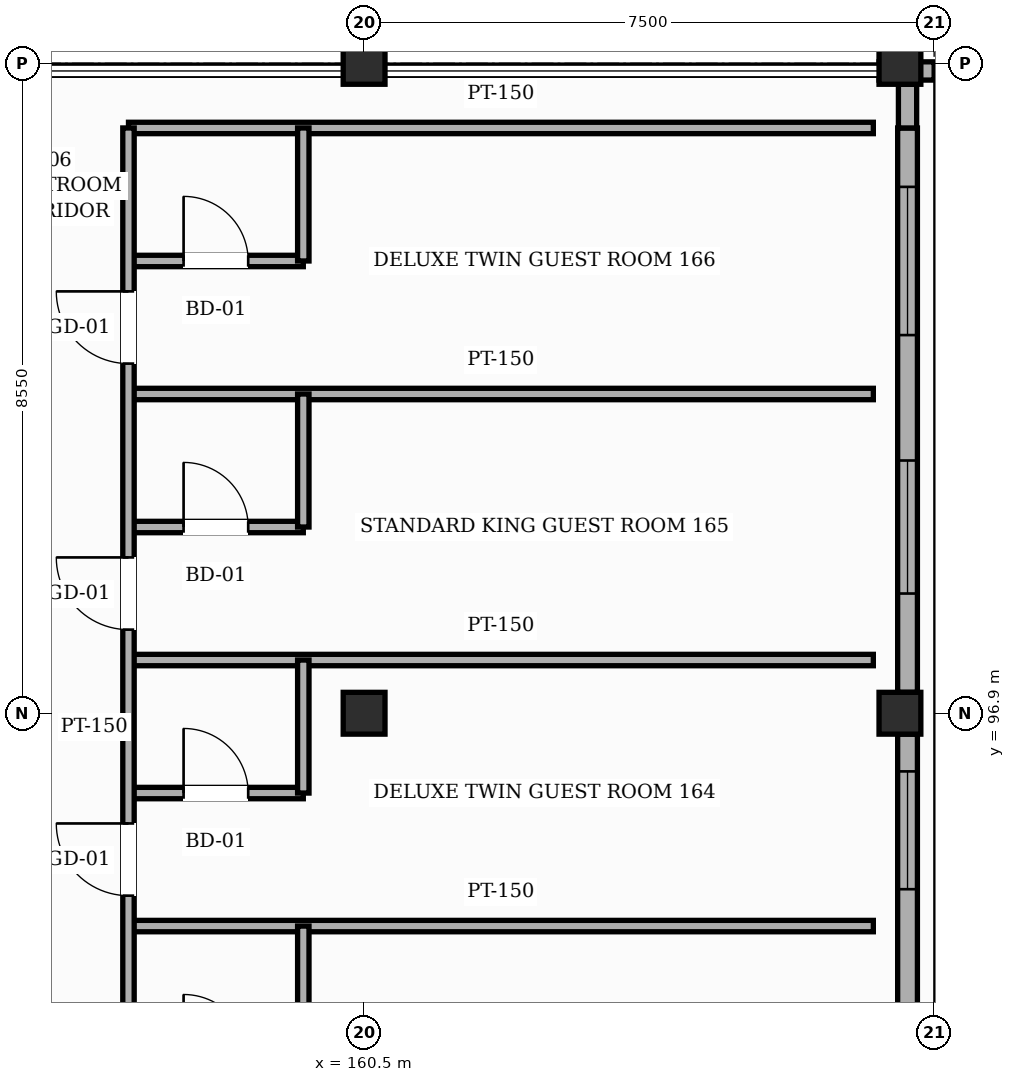
"""IFC4 building model, lengths in metres.
Left out: names, types, materials, properties, quantities, classifications, styles, units other than length and angle.
Written with IfcOpenShell. Run it as: python <this file> out.ifc"""

import sys

from ifc_helpers import new_model, si_unit, direction, frame, frame_2d, origin, origin_2d, place, context, subcontext, project, spatial, rectangle, hollow_rectangle, extrude, element, fill, save


model = new_model("IFC4")
c1 = context("Model", 3, precision=1e-05, world=origin(), true_north=direction((0.0, 1.0)))
c2 = subcontext(c1, "Body", "Model", "MODEL_VIEW")
j1 = project(units=[si_unit("LENGTHUNIT", "METRE"), si_unit("PLANEANGLEUNIT", "RADIAN")], contexts=[c1])
p1 = place(None, origin())
s1 = spatial("IfcSite", under=j1, at=p1, CompositionType="ELEMENT")
p2 = place(p1, origin())
s2 = spatial("IfcBuilding", under=s1, at=p2, CompositionType="ELEMENT")
p3 = place(p2, frame((0.0, 0.0, 28.2)))
s3 = spatial("IfcBuildingStorey", under=s2, at=p3, CompositionType="ELEMENT", Elevation=28.2)
p4 = place(p3, frame((160.5, 96.9, 0.0), z_axis=(0.0, 0.0, 1.0), x_axis=(1.0, 0.0, 0.0)))
e1 = element("IfcColumn", 1, at=p4, inside=s3, PredefinedType="COLUMN", context=c2, shape_type="SweptSolid", body=[
    extrude(hollow_rectangle(XDim=0.55, YDim=0.55, WallThickness=0.022, InnerFilletRadius=0.022, OuterFilletRadius=0.044, at=origin_2d()), origin(), (0.0, 0.0, 1.0), 3.6),
])
p5 = place(p3, frame((160.5, 105.45, 0.0), z_axis=(0.0, 0.0, 1.0), x_axis=(1.0, 0.0, 0.0)))
e2 = element("IfcColumn", 2, at=p5, inside=s3, PredefinedType="COLUMN", context=c2, shape_type="SweptSolid", body=[
    extrude(hollow_rectangle(XDim=0.55, YDim=0.55, WallThickness=0.022, InnerFilletRadius=0.022, OuterFilletRadius=0.044, at=origin_2d()), origin(), (0.0, 0.0, 1.0), 3.38),
])
p6 = place(p3, frame((167.55, 96.9, 0.0), z_axis=(0.0, 0.0, 1.0), x_axis=(1.0, 0.0, 0.0)))
e3 = element("IfcColumn", 3, at=p6, inside=s3, PredefinedType="COLUMN", context=c2, shape_type="SweptSolid", body=[
    extrude(hollow_rectangle(XDim=0.55, YDim=0.55, WallThickness=0.022, InnerFilletRadius=0.022, OuterFilletRadius=0.044, at=origin_2d()), origin(), (0.0, 0.0, 1.0), 3.6),
])
p7 = place(p3, frame((167.55, 105.45, 0.0), z_axis=(0.0, 0.0, 1.0), x_axis=(1.0, 0.0, 0.0)))
e4 = element("IfcColumn", 4, at=p7, inside=s3, PredefinedType="COLUMN", context=c2, shape_type="SweptSolid", body=[
    extrude(hollow_rectangle(XDim=0.55, YDim=0.55, WallThickness=0.022, InnerFilletRadius=0.022, OuterFilletRadius=0.044, at=origin_2d()), origin(), (0.0, 0.0, 1.0), 3.38),
])
p8 = place(p3, frame((167.65, 96.625, 0.0), z_axis=(0.0, 0.0, 1.0), x_axis=(0.0, -1.0, 0.0)))
e5 = element("IfcWall", 5, at=p8, inside=s3, PredefinedType="SOLIDWALL", context=c2, shape_type="SweptSolid", body=[
    extrude(rectangle(XDim=7.45, YDim=0.26, at=frame_2d((3.725, 0.0))), origin(), (0.0, 0.0, 1.0), 2.755),
])
p9 = place(p8, frame((3.6, 0.0, 0.85)))
e6 = element("IfcOpeningElement", 6, at=p9, cuts=e5, PredefinedType="OPENING", context=c2, shape_type="SweptSolid", body=[
    extrude(rectangle(XDim=1.35, YDim=1.35, at=frame_2d((0.675, 0.675))), frame((0.0, 0.14, 0.0), z_axis=(0.0, -1.0, 0.0), x_axis=(1.0, 0.0, 0.0)), (0.0, 0.0, 1.0), 0.28),
])
p10 = place(p8, frame((0.49, 0.0, 0.85)))
e7 = element("IfcOpeningElement", 7, at=p10, cuts=e5, PredefinedType="OPENING", context=c2, shape_type="SweptSolid", body=[
    extrude(rectangle(XDim=1.55, YDim=1.35, at=frame_2d((0.775, 0.675))), frame((0.0, 0.14, 0.0), z_axis=(0.0, -1.0, 0.0), x_axis=(1.0, 0.0, 0.0)), (0.0, 0.0, 1.0), 0.28),
])
p11 = place(p3, frame((167.65, 104.6, 0.0), z_axis=(0.0, 0.0, 1.0), x_axis=(0.0, -1.0, 0.0)))
e8 = element("IfcWall", 8, at=p11, inside=s3, PredefinedType="SOLIDWALL", context=c2, shape_type="SweptSolid", body=[
    extrude(rectangle(XDim=7.425, YDim=0.26, at=frame_2d((3.712, 0.0))), origin(), (0.0, 0.0, 1.0), 2.755),
])
p12 = place(p11, frame((4.375, 0.0, 0.85)))
e9 = element("IfcOpeningElement", 9, at=p12, cuts=e8, PredefinedType="OPENING", context=c2, shape_type="SweptSolid", body=[
    extrude(rectangle(XDim=1.75, YDim=1.35, at=frame_2d((0.875, 0.675))), frame((0.0, 0.14, 0.0), z_axis=(0.0, -1.0, 0.0), x_axis=(1.0, 0.0, 0.0)), (0.0, 0.0, 1.0), 0.28),
])
p13 = place(p11, frame((0.775, 0.0, 0.85)))
e10 = element("IfcOpeningElement", 10, at=p13, cuts=e8, PredefinedType="OPENING", context=c2, shape_type="SweptSolid", body=[
    extrude(rectangle(XDim=1.95, YDim=1.35, at=frame_2d((0.975, 0.675))), frame((0.0, 0.14, 0.0), z_axis=(0.0, -1.0, 0.0), x_axis=(1.0, 0.0, 0.0)), (0.0, 0.0, 1.0), 0.28),
])
p14 = place(p3, frame((167.65, 105.175, 0.0), z_axis=(0.0, 0.0, 1.0), x_axis=(0.0, -1.0, 0.0)))
e11 = element("IfcWall", 11, at=p14, inside=s3, PredefinedType="SOLIDWALL", context=c2, shape_type="SweptSolid", body=[
    extrude(rectangle(XDim=0.575, YDim=0.24, at=frame_2d((0.288, 0.0))), origin(), (0.0, 0.0, 1.0), 2.755),
])
p15 = place(p3, frame((167.275, 105.35, 0.0), z_axis=(0.0, 0.0, 1.0), x_axis=(1.0, 0.0, 0.0)))
e12 = element("IfcWall", 12, at=p15, inside=s3, PredefinedType="SOLIDWALL", context=c2, shape_type="SweptSolid", body=[
    extrude(rectangle(XDim=0.725, YDim=0.24, at=frame_2d((0.363, 0.0))), origin(), (0.0, 0.0, 1.0), 3.365),
])
p16 = place(p3, frame((157.4, 94.1, 0.0), z_axis=(0.0, 0.0, 1.0), x_axis=(1.0, 0.0, 0.0)))
e13 = element("IfcWall", 13, at=p16, inside=s3, PredefinedType="PARTITIONING", context=c2, shape_type="SweptSolid", body=[
    extrude(rectangle(XDim=9.8, YDim=0.15, at=frame_2d((4.9, 0.0))), origin(), (0.0, 0.0, 1.0), 3.365),
])
p17 = place(p3, frame((157.4, 95.85, 0.0), z_axis=(0.0, 0.0, 1.0), x_axis=(1.0, 0.0, 0.0)))
e14 = element("IfcWall", 14, at=p17, inside=s3, PredefinedType="PARTITIONING", context=c2, shape_type="SweptSolid", body=[
    extrude(rectangle(XDim=2.3, YDim=0.15, at=frame_2d((1.15, 0.0))), origin(), (0.0, 0.0, 1.0), 3.365),
])
p18 = place(p17, frame((0.725, 0.0, 0.0)))
e15 = element("IfcOpeningElement", 15, at=p18, cuts=e14, PredefinedType="OPENING", context=c2, shape_type="SweptSolid", body=[
    extrude(rectangle(XDim=0.85, YDim=2.1, at=frame_2d((0.425, 1.05))), frame((0.0, 0.085, 0.0), z_axis=(0.0, -1.0, 0.0), x_axis=(1.0, 0.0, 0.0)), (0.0, 0.0, 1.0), 0.17),
])
p19 = place(p3, frame((157.4, 97.6, 0.0), z_axis=(0.0, 0.0, 1.0), x_axis=(1.0, 0.0, 0.0)))
e16 = element("IfcWall", 16, at=p19, inside=s3, PredefinedType="PARTITIONING", context=c2, shape_type="SweptSolid", body=[
    extrude(rectangle(XDim=9.8, YDim=0.15, at=frame_2d((4.9, 0.0))), origin(), (0.0, 0.0, 1.0), 3.365),
])
p20 = place(p3, frame((157.4, 99.35, 0.0), z_axis=(0.0, 0.0, 1.0), x_axis=(1.0, 0.0, 0.0)))
e17 = element("IfcWall", 17, at=p20, inside=s3, PredefinedType="PARTITIONING", context=c2, shape_type="SweptSolid", body=[
    extrude(rectangle(XDim=2.3, YDim=0.15, at=frame_2d((1.15, 0.0))), origin(), (0.0, 0.0, 1.0), 3.365),
])
p21 = place(p20, frame((0.725, 0.0, 0.0)))
e18 = element("IfcOpeningElement", 18, at=p21, cuts=e17, PredefinedType="OPENING", context=c2, shape_type="SweptSolid", body=[
    extrude(rectangle(XDim=0.85, YDim=2.1, at=frame_2d((0.425, 1.05))), frame((0.0, 0.085, 0.0), z_axis=(0.0, -1.0, 0.0), x_axis=(1.0, 0.0, 0.0)), (0.0, 0.0, 1.0), 0.17),
])
p22 = place(p3, frame((157.4, 101.1, 0.0), z_axis=(0.0, 0.0, 1.0), x_axis=(1.0, 0.0, 0.0)))
e19 = element("IfcWall", 19, at=p22, inside=s3, PredefinedType="PARTITIONING", context=c2, shape_type="SweptSolid", body=[
    extrude(rectangle(XDim=9.8, YDim=0.15, at=frame_2d((4.9, 0.0))), origin(), (0.0, 0.0, 1.0), 3.005),
])
p23 = place(p3, frame((157.4, 102.85, 0.0), z_axis=(0.0, 0.0, 1.0), x_axis=(1.0, 0.0, 0.0)))
e20 = element("IfcWall", 20, at=p23, inside=s3, PredefinedType="PARTITIONING", context=c2, shape_type="SweptSolid", body=[
    extrude(rectangle(XDim=2.3, YDim=0.15, at=frame_2d((1.15, 0.0))), origin(), (0.0, 0.0, 1.0), 3.365),
])
p24 = place(p23, frame((0.725, 0.0, 0.0)))
e21 = element("IfcOpeningElement", 21, at=p24, cuts=e20, PredefinedType="OPENING", context=c2, shape_type="SweptSolid", body=[
    extrude(rectangle(XDim=0.85, YDim=2.1, at=frame_2d((0.425, 1.05))), frame((0.0, 0.085, 0.0), z_axis=(0.0, -1.0, 0.0), x_axis=(1.0, 0.0, 0.0)), (0.0, 0.0, 1.0), 0.17),
])
p25 = place(p3, frame((157.4, 104.6, 0.0), z_axis=(0.0, 0.0, 1.0), x_axis=(1.0, 0.0, 0.0)))
e22 = element("IfcWall", 22, at=p25, inside=s3, PredefinedType="PARTITIONING", context=c2, shape_type="SweptSolid", body=[
    extrude(rectangle(XDim=9.8, YDim=0.15, at=frame_2d((4.9, 0.0))), origin(), (0.0, 0.0, 1.0), 3.365),
])
p26 = place(p3, frame((157.4, 76.6, 0.0), z_axis=(0.0, 0.0, 1.0), x_axis=(0.0, 1.0, 0.0)))
e23 = element("IfcWall", 23, at=p26, inside=s3, PredefinedType="PARTITIONING", context=c2, shape_type="SweptSolid", body=[
    extrude(rectangle(XDim=28.0, YDim=0.15, at=frame_2d((14.0, 0.0))), origin(), (0.0, 0.0, 1.0), 3.365),
])
p27 = place(p26, frame((0.325, 0.0, 0.0)))
e24 = element("IfcOpeningElement", 24, at=p27, cuts=e23, PredefinedType="OPENING", context=c2, shape_type="SweptSolid", body=[
    extrude(rectangle(XDim=1.1, YDim=2.2, at=frame_2d((0.55, 1.1))), frame((0.0, 0.085, 0.0), z_axis=(0.0, -1.0, 0.0), x_axis=(1.0, 0.0, 0.0)), (0.0, 0.0, 1.0), 0.17),
])
p28 = place(p26, frame((3.9, 0.0, 0.0)))
e25 = element("IfcOpeningElement", 25, at=p28, cuts=e23, PredefinedType="OPENING", context=c2, shape_type="SweptSolid", body=[
    extrude(rectangle(XDim=0.95, YDim=2.15, at=frame_2d((0.475, 1.075))), frame((0.0, 0.085, 0.0), z_axis=(0.0, -1.0, 0.0), x_axis=(1.0, 0.0, 0.0)), (0.0, 0.0, 1.0), 0.17),
])
p29 = place(p26, frame((7.4, 0.0, 0.0)))
e26 = element("IfcOpeningElement", 26, at=p29, cuts=e23, PredefinedType="OPENING", context=c2, shape_type="SweptSolid", body=[
    extrude(rectangle(XDim=0.95, YDim=2.15, at=frame_2d((0.475, 1.075))), frame((0.0, 0.085, 0.0), z_axis=(0.0, -1.0, 0.0), x_axis=(1.0, 0.0, 0.0)), (0.0, 0.0, 1.0), 0.17),
])
p30 = place(p26, frame((10.9, 0.0, 0.0)))
e27 = element("IfcOpeningElement", 27, at=p30, cuts=e23, PredefinedType="OPENING", context=c2, shape_type="SweptSolid", body=[
    extrude(rectangle(XDim=0.95, YDim=2.15, at=frame_2d((0.475, 1.075))), frame((0.0, 0.085, 0.0), z_axis=(0.0, -1.0, 0.0), x_axis=(1.0, 0.0, 0.0)), (0.0, 0.0, 1.0), 0.17),
])
p31 = place(p26, frame((14.4, 0.0, 0.0)))
e28 = element("IfcOpeningElement", 28, at=p31, cuts=e23, PredefinedType="OPENING", context=c2, shape_type="SweptSolid", body=[
    extrude(rectangle(XDim=0.95, YDim=2.15, at=frame_2d((0.475, 1.075))), frame((0.0, 0.085, 0.0), z_axis=(0.0, -1.0, 0.0), x_axis=(1.0, 0.0, 0.0)), (0.0, 0.0, 1.0), 0.17),
])
p32 = place(p26, frame((17.9, 0.0, 0.0)))
e29 = element("IfcOpeningElement", 29, at=p32, cuts=e23, PredefinedType="OPENING", context=c2, shape_type="SweptSolid", body=[
    extrude(rectangle(XDim=0.95, YDim=2.15, at=frame_2d((0.475, 1.075))), frame((0.0, 0.085, 0.0), z_axis=(0.0, -1.0, 0.0), x_axis=(1.0, 0.0, 0.0)), (0.0, 0.0, 1.0), 0.17),
])
p33 = place(p26, frame((21.4, 0.0, 0.0)))
e30 = element("IfcOpeningElement", 30, at=p33, cuts=e23, PredefinedType="OPENING", context=c2, shape_type="SweptSolid", body=[
    extrude(rectangle(XDim=0.95, YDim=2.15, at=frame_2d((0.475, 1.075))), frame((0.0, 0.085, 0.0), z_axis=(0.0, -1.0, 0.0), x_axis=(1.0, 0.0, 0.0)), (0.0, 0.0, 1.0), 0.17),
])
p34 = place(p26, frame((24.9, 0.0, 0.0)))
e31 = element("IfcOpeningElement", 31, at=p34, cuts=e23, PredefinedType="OPENING", context=c2, shape_type="SweptSolid", body=[
    extrude(rectangle(XDim=0.95, YDim=2.15, at=frame_2d((0.475, 1.075))), frame((0.0, 0.085, 0.0), z_axis=(0.0, -1.0, 0.0), x_axis=(1.0, 0.0, 0.0)), (0.0, 0.0, 1.0), 0.17),
])
for number, where, z_axis, x_axis in (
    (32, (159.7, 92.35, 0.0), (0.0, 0.0, 1.0), (0.0, 1.0, 0.0)),
    (33, (159.7, 95.85, 0.0), (0.0, 0.0, 1.0), (0.0, 1.0, 0.0)),
    (34, (159.7, 99.35, 0.0), (0.0, 0.0, 1.0), (0.0, 1.0, 0.0)),
    (35, (159.7, 102.85, 0.0), (0.0, 0.0, 1.0), (0.0, 1.0, 0.0)),
):
    element("IfcWall", number, at=place(p3, frame(where, z_axis=z_axis, x_axis=x_axis)), inside=s3, PredefinedType="PARTITIONING", context=c2, shape_type="SweptSolid", body=[
        extrude(rectangle(XDim=1.75, YDim=0.15, at=frame_2d((0.875, 0.0))), origin(), (0.0, 0.0, 1.0), 3.365),
    ])
p35 = place(p10, origin())
e36 = element("IfcWindow", 36, at=p35, inside=s3, PartitioningType="SINGLE_PANEL", PredefinedType="WINDOW", context=c2, shape_type="SweptSolid", body=[
    extrude(rectangle(XDim=1.55, YDim=1.35, at=frame_2d((0.775, 0.675))), frame((0.0, 0.03, 0.0), z_axis=(0.0, -1.0, 0.0), x_axis=(1.0, 0.0, 0.0)), (0.0, 0.0, 1.0), 0.06),
])
fill(e7, e36)
p36 = place(p12, origin())
e37 = element("IfcWindow", 37, at=p36, inside=s3, PartitioningType="SINGLE_PANEL", PredefinedType="WINDOW", context=c2, shape_type="SweptSolid", body=[
    extrude(rectangle(XDim=1.75, YDim=1.35, at=frame_2d((0.875, 0.675))), frame((0.0, 0.03, 0.0), z_axis=(0.0, -1.0, 0.0), x_axis=(1.0, 0.0, 0.0)), (0.0, 0.0, 1.0), 0.06),
])
fill(e9, e37)
p37 = place(p13, origin())
e38 = element("IfcWindow", 38, at=p37, inside=s3, PartitioningType="SINGLE_PANEL", PredefinedType="WINDOW", context=c2, shape_type="SweptSolid", body=[
    extrude(rectangle(XDim=1.95, YDim=1.35, at=frame_2d((0.975, 0.675))), frame((0.0, 0.03, 0.0), z_axis=(0.0, -1.0, 0.0), x_axis=(1.0, 0.0, 0.0)), (0.0, 0.0, 1.0), 0.06),
])
fill(e10, e38)
p38 = place(p32, origin())
e39 = element("IfcDoor", 39, at=p38, inside=s3, OperationType="SINGLE_SWING_RIGHT", PredefinedType="DOOR", context=c2, shape_type="SweptSolid", body=[
    extrude(rectangle(XDim=0.95, YDim=2.15, at=frame_2d((0.475, 1.075))), frame((0.0, 0.025, 0.0), z_axis=(0.0, -1.0, 0.0), x_axis=(1.0, 0.0, 0.0)), (0.0, 0.0, 1.0), 0.05),
])
fill(e29, e39)
p39 = place(p18, origin())
e40 = element("IfcDoor", 40, at=p39, inside=s3, OperationType="SINGLE_SWING_LEFT", PredefinedType="DOOR", context=c2, shape_type="SweptSolid", body=[
    extrude(rectangle(XDim=0.85, YDim=2.1, at=frame_2d((0.425, 1.05))), frame((0.0, 0.025, 0.0), z_axis=(0.0, -1.0, 0.0), x_axis=(1.0, 0.0, 0.0)), (0.0, 0.0, 1.0), 0.05),
])
fill(e15, e40)
p40 = place(p33, origin())
e41 = element("IfcDoor", 41, at=p40, inside=s3, OperationType="SINGLE_SWING_RIGHT", PredefinedType="DOOR", context=c2, shape_type="SweptSolid", body=[
    extrude(rectangle(XDim=0.95, YDim=2.15, at=frame_2d((0.475, 1.075))), frame((0.0, 0.025, 0.0), z_axis=(0.0, -1.0, 0.0), x_axis=(1.0, 0.0, 0.0)), (0.0, 0.0, 1.0), 0.05),
])
fill(e30, e41)
p41 = place(p21, origin())
e42 = element("IfcDoor", 42, at=p41, inside=s3, OperationType="SINGLE_SWING_LEFT", PredefinedType="DOOR", context=c2, shape_type="SweptSolid", body=[
    extrude(rectangle(XDim=0.85, YDim=2.1, at=frame_2d((0.425, 1.05))), frame((0.0, 0.025, 0.0), z_axis=(0.0, -1.0, 0.0), x_axis=(1.0, 0.0, 0.0)), (0.0, 0.0, 1.0), 0.05),
])
fill(e18, e42)
p42 = place(p34, origin())
e43 = element("IfcDoor", 43, at=p42, inside=s3, OperationType="SINGLE_SWING_RIGHT", PredefinedType="DOOR", context=c2, shape_type="SweptSolid", body=[
    extrude(rectangle(XDim=0.95, YDim=2.15, at=frame_2d((0.475, 1.075))), frame((0.0, 0.025, 0.0), z_axis=(0.0, -1.0, 0.0), x_axis=(1.0, 0.0, 0.0)), (0.0, 0.0, 1.0), 0.05),
])
fill(e31, e43)
p43 = place(p24, origin())
e44 = element("IfcDoor", 44, at=p43, inside=s3, OperationType="SINGLE_SWING_LEFT", PredefinedType="DOOR", context=c2, shape_type="SweptSolid", body=[
    extrude(rectangle(XDim=0.85, YDim=2.1, at=frame_2d((0.425, 1.05))), frame((0.0, 0.025, 0.0), z_axis=(0.0, -1.0, 0.0), x_axis=(1.0, 0.0, 0.0)), (0.0, 0.0, 1.0), 0.05),
])
fill(e21, e44)
save(model, sys.argv[1])
